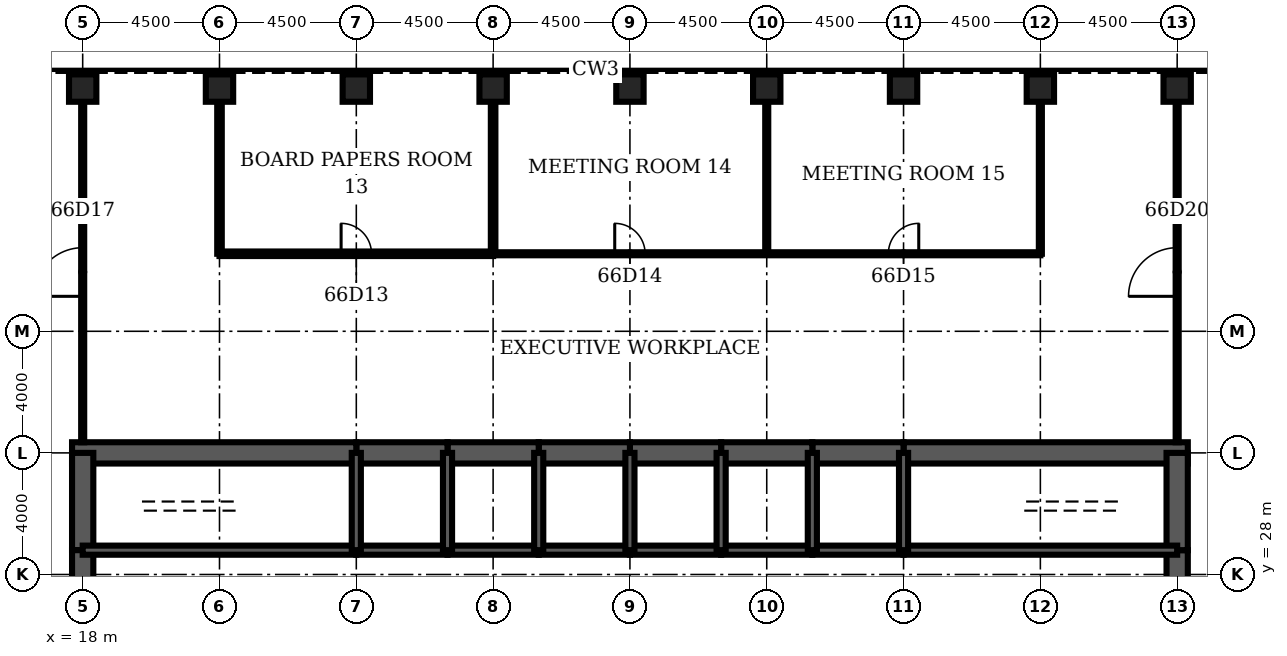
"""IFC4 building model, lengths in metres.
Left out: names, types, materials, properties, quantities, classifications, styles, units other than length and angle.
Written with IfcOpenShell. Run it as: python <this file> out.ifc"""

import sys

from ifc_helpers import new_model, si_unit, direction, frame, frame_2d, origin, origin_2d, place, context, subcontext, project, spatial, rectangle, hollow_rectangle, extrude, element, fill, save


model = new_model("IFC4")
c1 = context("Model", 3, precision=1e-05, world=origin(), true_north=direction((0.0, 1.0)))
c2 = subcontext(c1, "Body", "Model", "MODEL_VIEW")
j1 = project(units=[si_unit("LENGTHUNIT", "METRE"), si_unit("PLANEANGLEUNIT", "RADIAN")], contexts=[c1])
p1 = place(None, origin())
s1 = spatial("IfcSite", under=j1, at=p1, CompositionType="ELEMENT")
p2 = place(p1, origin())
s2 = spatial("IfcBuilding", under=s1, at=p2, CompositionType="ELEMENT")
p3 = place(p2, frame((0.0, 0.0, 292.1)))
s3 = spatial("IfcBuildingStorey", under=s2, at=p3, CompositionType="ELEMENT", Elevation=292.1)
for number, where, z_axis, x_axis in (
    (1, (54.0, 44.0, 0.0), (0.0, 0.0, 1.0), (0.0, 1.0, 0.0)),
    (2, (49.5, 44.0, 0.0), (0.0, 0.0, 1.0), (0.0, 1.0, 0.0)),
    (3, (45.0, 44.0, 0.0), (0.0, 0.0, 1.0), (0.0, 1.0, 0.0)),
    (4, (40.5, 44.0, 0.0), (0.0, 0.0, 1.0), (0.0, 1.0, 0.0)),
    (5, (36.0, 44.0, 0.0), (0.0, 0.0, 1.0), (0.0, 1.0, 0.0)),
    (6, (31.5, 44.0, 0.0), (0.0, 0.0, 1.0), (0.0, 1.0, 0.0)),
    (7, (27.0, 44.0, 0.0), (0.0, 0.0, 1.0), (0.0, 1.0, 0.0)),
    (8, (22.5, 44.0, 0.0), (0.0, 0.0, 1.0), (0.0, 1.0, 0.0)),
    (9, (18.0, 44.0, 0.0), (0.0, 0.0, 1.0), (0.0, 1.0, 0.0)),
):
    element("IfcColumn", number, at=place(p3, frame(where, z_axis=z_axis, x_axis=x_axis)), inside=s3, PredefinedType="COLUMN", context=c2, shape_type="SweptSolid", body=[
        extrude(hollow_rectangle(XDim=0.9, YDim=0.9, WallThickness=0.06, at=origin_2d()), origin(), (0.0, 0.0, 1.0), 4.2),
    ])
p4 = place(p3, frame((54.35, 32.0, 0.0), z_axis=(0.0, 0.0, 1.0), x_axis=(-1.0, 0.0, 0.0)))
e10 = element("IfcWall", 10, at=p4, inside=s3, PredefinedType="SHEAR", context=c2, shape_type="SweptSolid", body=[
    extrude(rectangle(XDim=9.35, YDim=0.7, at=frame_2d((4.675, 0.0))), origin(), (0.0, 0.0, 1.0), 4.2),
])
for number, where, z_axis, x_axis in (
    (11, (45.0, 32.0, 0.0), (0.0, 0.0, 1.0), (-1.0, 0.0, 0.0)),
    (12, (42.0, 32.0, 0.0), (0.0, 0.0, 1.0), (-1.0, 0.0, 0.0)),
    (13, (39.0, 32.0, 0.0), (0.0, 0.0, 1.0), (-1.0, 0.0, 0.0)),
    (14, (36.0, 32.0, 0.0), (0.0, 0.0, 1.0), (-1.0, 0.0, 0.0)),
    (15, (33.0, 32.0, 0.0), (0.0, 0.0, 1.0), (-1.0, 0.0, 0.0)),
    (16, (30.0, 32.0, 0.0), (0.0, 0.0, 1.0), (-1.0, 0.0, 0.0)),
):
    element("IfcWall", number, at=place(p3, frame(where, z_axis=z_axis, x_axis=x_axis)), inside=s3, PredefinedType="SHEAR", context=c2, shape_type="SweptSolid", body=[
        extrude(rectangle(XDim=3.0, YDim=0.7, at=frame_2d((1.5, 0.0))), origin(), (0.0, 0.0, 1.0), 4.2),
    ])
p5 = place(p3, frame((27.0, 32.0, 0.0), z_axis=(0.0, 0.0, 1.0), x_axis=(-1.0, 0.0, 0.0)))
e17 = element("IfcWall", 17, at=p5, inside=s3, PredefinedType="SHEAR", context=c2, shape_type="SweptSolid", body=[
    extrude(rectangle(XDim=9.35, YDim=0.7, at=frame_2d((4.675, 0.0))), origin(), (0.0, 0.0, 1.0), 4.2),
])
p6 = place(p3, frame((18.0, 32.0, 0.0), z_axis=(0.0, 0.0, 1.0), x_axis=(0.0, -1.0, 0.0)))
e18 = element("IfcWall", 18, at=p6, inside=s3, PredefinedType="SHEAR", context=c2, shape_type="SweptSolid", body=[
    extrude(rectangle(XDim=3.2, YDim=0.7, at=frame_2d((1.6, 0.0))), origin(), (0.0, 0.0, 1.0), 4.2),
])
p7 = place(p3, frame((18.0, 28.8, 0.0), z_axis=(0.0, 0.0, 1.0), x_axis=(0.0, -1.0, 0.0)))
e19 = element("IfcWall", 19, at=p7, inside=s3, PredefinedType="SHEAR", context=c2, shape_type="SweptSolid", body=[
    extrude(rectangle(XDim=2.8, YDim=0.7, at=frame_2d((1.4, 0.0))), origin(), (0.0, 0.0, 1.0), 4.2),
])
p8 = place(p7, frame((0.4, 0.0, 0.0)))
e20 = element("IfcOpeningElement", 20, at=p8, cuts=e19, PredefinedType="OPENING", context=c2, shape_type="SweptSolid", body=[
    extrude(rectangle(XDim=1.8, YDim=2.1, at=frame_2d((0.9, 1.05))), frame((0.0, 0.36, 0.0), z_axis=(0.0, -1.0, 0.0), x_axis=(1.0, 0.0, 0.0)), (0.0, 0.0, 1.0), 0.72),
])
p9 = place(p3, frame((54.0, 26.0, 0.0), z_axis=(0.0, 0.0, 1.0), x_axis=(0.0, 1.0, 0.0)))
e21 = element("IfcWall", 21, at=p9, inside=s3, PredefinedType="SHEAR", context=c2, shape_type="SweptSolid", body=[
    extrude(rectangle(XDim=2.8, YDim=0.7, at=frame_2d((1.4, 0.0))), origin(), (0.0, 0.0, 1.0), 4.2),
])
p10 = place(p9, frame((0.6, 0.0, 0.0)))
e22 = element("IfcOpeningElement", 22, at=p10, cuts=e21, PredefinedType="OPENING", context=c2, shape_type="SweptSolid", body=[
    extrude(rectangle(XDim=1.8, YDim=2.1, at=frame_2d((0.9, 1.05))), frame((0.0, 0.36, 0.0), z_axis=(0.0, -1.0, 0.0), x_axis=(1.0, 0.0, 0.0)), (0.0, 0.0, 1.0), 0.72),
])
p11 = place(p3, frame((54.0, 28.8, 0.0), z_axis=(0.0, 0.0, 1.0), x_axis=(0.0, 1.0, 0.0)))
e23 = element("IfcWall", 23, at=p11, inside=s3, PredefinedType="SHEAR", context=c2, shape_type="SweptSolid", body=[
    extrude(rectangle(XDim=3.2, YDim=0.7, at=frame_2d((1.6, 0.0))), origin(), (0.0, 0.0, 1.0), 4.2),
])
p12 = place(p3, frame((18.0, 28.8, 0.0), z_axis=(0.0, 0.0, 1.0), x_axis=(1.0, 0.0, 0.0)))
e24 = element("IfcWall", 24, at=p12, inside=s3, PredefinedType="SOLIDWALL", context=c2, shape_type="SweptSolid", body=[
    extrude(rectangle(XDim=9.0, YDim=0.3, at=frame_2d((4.5, 0.0))), origin(), (0.0, 0.0, 1.0), 4.2),
])
p13 = place(p12, frame((0.65, 0.0, 0.0)))
e25 = element("IfcOpeningElement", 25, at=p13, cuts=e24, PredefinedType="OPENING", context=c2, shape_type="SweptSolid", body=[
    extrude(rectangle(XDim=1.0, YDim=2.1, at=frame_2d((0.5, 1.05))), frame((0.0, 0.16, 0.0), z_axis=(0.0, -1.0, 0.0), x_axis=(1.0, 0.0, 0.0)), (0.0, 0.0, 1.0), 0.32),
])
p14 = place(p3, frame((27.0, 28.8, 0.0), z_axis=(0.0, 0.0, 1.0), x_axis=(1.0, 0.0, 0.0)))
e26 = element("IfcWall", 26, at=p14, inside=s3, PredefinedType="SOLIDWALL", context=c2, shape_type="SweptSolid", body=[
    extrude(rectangle(XDim=3.0, YDim=0.3, at=frame_2d((1.5, 0.0))), origin(), (0.0, 0.0, 1.0), 4.2),
])
p15 = place(p14, frame((0.95, 0.0, 0.0)))
e27 = element("IfcOpeningElement", 27, at=p15, cuts=e26, PredefinedType="OPENING", context=c2, shape_type="SweptSolid", body=[
    extrude(rectangle(XDim=1.1, YDim=2.2, at=frame_2d((0.55, 1.1))), frame((0.0, 0.16, 0.0), z_axis=(0.0, -1.0, 0.0), x_axis=(1.0, 0.0, 0.0)), (0.0, 0.0, 1.0), 0.32),
])
p16 = place(p3, frame((30.0, 28.8, 0.0), z_axis=(0.0, 0.0, 1.0), x_axis=(1.0, 0.0, 0.0)))
e28 = element("IfcWall", 28, at=p16, inside=s3, PredefinedType="SOLIDWALL", context=c2, shape_type="SweptSolid", body=[
    extrude(rectangle(XDim=3.0, YDim=0.3, at=frame_2d((1.5, 0.0))), origin(), (0.0, 0.0, 1.0), 4.2),
])
p17 = place(p16, frame((0.95, 0.0, 0.0)))
e29 = element("IfcOpeningElement", 29, at=p17, cuts=e28, PredefinedType="OPENING", context=c2, shape_type="SweptSolid", body=[
    extrude(rectangle(XDim=1.1, YDim=2.2, at=frame_2d((0.55, 1.1))), frame((0.0, 0.16, 0.0), z_axis=(0.0, -1.0, 0.0), x_axis=(1.0, 0.0, 0.0)), (0.0, 0.0, 1.0), 0.32),
])
p18 = place(p3, frame((33.0, 28.8, 0.0), z_axis=(0.0, 0.0, 1.0), x_axis=(1.0, 0.0, 0.0)))
e30 = element("IfcWall", 30, at=p18, inside=s3, PredefinedType="SOLIDWALL", context=c2, shape_type="SweptSolid", body=[
    extrude(rectangle(XDim=3.0, YDim=0.3, at=frame_2d((1.5, 0.0))), origin(), (0.0, 0.0, 1.0), 4.2),
])
p19 = place(p18, frame((0.95, 0.0, 0.0)))
e31 = element("IfcOpeningElement", 31, at=p19, cuts=e30, PredefinedType="OPENING", context=c2, shape_type="SweptSolid", body=[
    extrude(rectangle(XDim=1.1, YDim=2.2, at=frame_2d((0.55, 1.1))), frame((0.0, 0.16, 0.0), z_axis=(0.0, -1.0, 0.0), x_axis=(1.0, 0.0, 0.0)), (0.0, 0.0, 1.0), 0.32),
])
p20 = place(p3, frame((36.0, 28.8, 0.0), z_axis=(0.0, 0.0, 1.0), x_axis=(1.0, 0.0, 0.0)))
e32 = element("IfcWall", 32, at=p20, inside=s3, PredefinedType="SOLIDWALL", context=c2, shape_type="SweptSolid", body=[
    extrude(rectangle(XDim=3.0, YDim=0.3, at=frame_2d((1.5, 0.0))), origin(), (0.0, 0.0, 1.0), 4.2),
])
p21 = place(p20, frame((1.0, 0.0, 0.0)))
e33 = element("IfcOpeningElement", 33, at=p21, cuts=e32, PredefinedType="OPENING", context=c2, shape_type="SweptSolid", body=[
    extrude(rectangle(XDim=1.0, YDim=2.1, at=frame_2d((0.5, 1.05))), frame((0.0, 0.16, 0.0), z_axis=(0.0, -1.0, 0.0), x_axis=(1.0, 0.0, 0.0)), (0.0, 0.0, 1.0), 0.32),
])
p22 = place(p3, frame((39.0, 28.8, 0.0), z_axis=(0.0, 0.0, 1.0), x_axis=(1.0, 0.0, 0.0)))
e34 = element("IfcWall", 34, at=p22, inside=s3, PredefinedType="SOLIDWALL", context=c2, shape_type="SweptSolid", body=[
    extrude(rectangle(XDim=3.0, YDim=0.3, at=frame_2d((1.5, 0.0))), origin(), (0.0, 0.0, 1.0), 4.2),
])
p23 = place(p22, frame((1.0, 0.0, 0.0)))
e35 = element("IfcOpeningElement", 35, at=p23, cuts=e34, PredefinedType="OPENING", context=c2, shape_type="SweptSolid", body=[
    extrude(rectangle(XDim=1.0, YDim=2.1, at=frame_2d((0.5, 1.05))), frame((0.0, 0.16, 0.0), z_axis=(0.0, -1.0, 0.0), x_axis=(1.0, 0.0, 0.0)), (0.0, 0.0, 1.0), 0.32),
])
p24 = place(p3, frame((42.0, 28.8, 0.0), z_axis=(0.0, 0.0, 1.0), x_axis=(1.0, 0.0, 0.0)))
e36 = element("IfcWall", 36, at=p24, inside=s3, PredefinedType="SOLIDWALL", context=c2, shape_type="SweptSolid", body=[
    extrude(rectangle(XDim=3.0, YDim=0.3, at=frame_2d((1.5, 0.0))), origin(), (0.0, 0.0, 1.0), 4.2),
])
p25 = place(p24, frame((0.95, 0.0, 0.0)))
e37 = element("IfcOpeningElement", 37, at=p25, cuts=e36, PredefinedType="OPENING", context=c2, shape_type="SweptSolid", body=[
    extrude(rectangle(XDim=1.1, YDim=2.2, at=frame_2d((0.55, 1.1))), frame((0.0, 0.16, 0.0), z_axis=(0.0, -1.0, 0.0), x_axis=(1.0, 0.0, 0.0)), (0.0, 0.0, 1.0), 0.32),
])
p26 = place(p3, frame((45.0, 28.8, 0.0), z_axis=(0.0, 0.0, 1.0), x_axis=(1.0, 0.0, 0.0)))
e38 = element("IfcWall", 38, at=p26, inside=s3, PredefinedType="SOLIDWALL", context=c2, shape_type="SweptSolid", body=[
    extrude(rectangle(XDim=9.0, YDim=0.3, at=frame_2d((4.5, 0.0))), origin(), (0.0, 0.0, 1.0), 4.2),
])
p27 = place(p26, frame((7.35, 0.0, 0.0)))
e39 = element("IfcOpeningElement", 39, at=p27, cuts=e38, PredefinedType="OPENING", context=c2, shape_type="SweptSolid", body=[
    extrude(rectangle(XDim=1.0, YDim=2.1, at=frame_2d((0.5, 1.05))), frame((0.0, 0.16, 0.0), z_axis=(0.0, -1.0, 0.0), x_axis=(1.0, 0.0, 0.0)), (0.0, 0.0, 1.0), 0.32),
])
for number, where, z_axis, x_axis in (
    (40, (27.0, 28.8, 0.0), (0.0, 0.0, 1.0), (0.0, 1.0, 0.0)),
    (41, (30.0, 28.8, 0.0), (0.0, 0.0, 1.0), (0.0, 1.0, 0.0)),
    (42, (33.0, 28.8, 0.0), (0.0, 0.0, 1.0), (0.0, 1.0, 0.0)),
    (43, (36.0, 28.8, 0.0), (0.0, 0.0, 1.0), (0.0, 1.0, 0.0)),
    (44, (39.0, 28.8, 0.0), (0.0, 0.0, 1.0), (0.0, 1.0, 0.0)),
    (45, (42.0, 28.8, 0.0), (0.0, 0.0, 1.0), (0.0, 1.0, 0.0)),
    (46, (45.0, 28.8, 0.0), (0.0, 0.0, 1.0), (0.0, 1.0, 0.0)),
):
    element("IfcWall", number, at=place(p3, frame(where, z_axis=z_axis, x_axis=x_axis)), inside=s3, PredefinedType="SOLIDWALL", context=c2, shape_type="SweptSolid", body=[
        extrude(rectangle(XDim=3.2, YDim=0.3, at=frame_2d((1.6, 0.0))), origin(), (0.0, 0.0, 1.0), 4.2),
    ])
p28 = place(p3, frame((22.5, 38.55, 0.0), z_axis=(0.0, 0.0, 1.0), x_axis=(1.0, 0.0, 0.0)))
e47 = element("IfcWall", 47, at=p28, inside=s3, PredefinedType="PARTITIONING", context=c2, shape_type="SweptSolid", body=[
    extrude(rectangle(XDim=9.0, YDim=0.15, at=frame_2d((4.5, 0.0))), origin(), (0.0, 0.0, 1.0), 3.0),
])
p29 = place(p28, frame((4.0, 0.0, 0.0)))
e48 = element("IfcOpeningElement", 48, at=p29, cuts=e47, PredefinedType="OPENING", context=c2, shape_type="SweptSolid", body=[
    extrude(rectangle(XDim=1.0, YDim=2.1, at=frame_2d((0.5, 1.05))), frame((0.0, 0.085, 0.0), z_axis=(0.0, -1.0, 0.0), x_axis=(1.0, 0.0, 0.0)), (0.0, 0.0, 1.0), 0.17),
])
p30 = place(p3, frame((31.5, 38.55, 0.0), z_axis=(0.0, 0.0, 1.0), x_axis=(1.0, 0.0, 0.0)))
e49 = element("IfcWall", 49, at=p30, inside=s3, PredefinedType="PARTITIONING", context=c2, shape_type="SweptSolid", body=[
    extrude(rectangle(XDim=18.0, YDim=0.1, at=frame_2d((9.0, 0.0))), origin(), (0.0, 0.0, 1.0), 3.0),
])
p31 = place(p30, frame((4.0, 0.0, 0.0)))
e50 = element("IfcOpeningElement", 50, at=p31, cuts=e49, PredefinedType="OPENING", context=c2, shape_type="SweptSolid", body=[
    extrude(rectangle(XDim=1.0, YDim=2.1, at=frame_2d((0.5, 1.05))), frame((0.0, 0.06, 0.0), z_axis=(0.0, -1.0, 0.0), x_axis=(1.0, 0.0, 0.0)), (0.0, 0.0, 1.0), 0.12),
])
p32 = place(p30, frame((13.0, 0.0, 0.0)))
e51 = element("IfcOpeningElement", 51, at=p32, cuts=e49, PredefinedType="OPENING", context=c2, shape_type="SweptSolid", body=[
    extrude(rectangle(XDim=1.0, YDim=2.1, at=frame_2d((0.5, 1.05))), frame((0.0, 0.06, 0.0), z_axis=(0.0, -1.0, 0.0), x_axis=(1.0, 0.0, 0.0)), (0.0, 0.0, 1.0), 0.12),
])
p33 = place(p3, frame((18.0, 32.35, 0.0), z_axis=(0.0, 0.0, 1.0), x_axis=(0.0, 1.0, 0.0)))
e52 = element("IfcWall", 52, at=p33, inside=s3, PredefinedType="PARTITIONING", context=c2, shape_type="SweptSolid", body=[
    extrude(rectangle(XDim=11.2, YDim=0.1, at=frame_2d((5.6, 0.0))), origin(), (0.0, 0.0, 1.0), 3.0),
])
p34 = place(p33, frame((4.8, 0.0, 0.0)))
e53 = element("IfcOpeningElement", 53, at=p34, cuts=e52, PredefinedType="OPENING", context=c2, shape_type="SweptSolid", body=[
    extrude(rectangle(XDim=1.6, YDim=2.1, at=frame_2d((0.8, 1.05))), frame((0.0, 0.06, 0.0), z_axis=(0.0, -1.0, 0.0), x_axis=(1.0, 0.0, 0.0)), (0.0, 0.0, 1.0), 0.12),
])
for number, where, z_axis, x_axis in (
    (54, (22.5, 38.55, 0.0), (0.0, 0.0, 1.0), (0.0, 1.0, 0.0)),
    (55, (31.5, 38.55, 0.0), (0.0, 0.0, 1.0), (0.0, 1.0, 0.0)),
):
    element("IfcWall", number, at=place(p3, frame(where, z_axis=z_axis, x_axis=x_axis)), inside=s3, PredefinedType="PARTITIONING", context=c2, shape_type="SweptSolid", body=[
        extrude(rectangle(XDim=5.0, YDim=0.15, at=frame_2d((2.5, 0.0))), origin(), (0.0, 0.0, 1.0), 3.0),
    ])
for number, where, z_axis, x_axis in (
    (56, (40.5, 38.55, 0.0), (0.0, 0.0, 1.0), (0.0, 1.0, 0.0)),
    (57, (49.5, 38.55, 0.0), (0.0, 0.0, 1.0), (0.0, 1.0, 0.0)),
):
    element("IfcWall", number, at=place(p3, frame(where, z_axis=z_axis, x_axis=x_axis)), inside=s3, PredefinedType="PARTITIONING", context=c2, shape_type="SweptSolid", body=[
        extrude(rectangle(XDim=5.0, YDim=0.1, at=frame_2d((2.5, 0.0))), origin(), (0.0, 0.0, 1.0), 3.0),
    ])
p35 = place(p3, frame((54.0, 32.35, 0.0), z_axis=(0.0, 0.0, 1.0), x_axis=(0.0, 1.0, 0.0)))
e58 = element("IfcWall", 58, at=p35, inside=s3, PredefinedType="PARTITIONING", context=c2, shape_type="SweptSolid", body=[
    extrude(rectangle(XDim=11.2, YDim=0.1, at=frame_2d((5.6, 0.0))), origin(), (0.0, 0.0, 1.0), 3.0),
])
p36 = place(p35, frame((4.8, 0.0, 0.0)))
e59 = element("IfcOpeningElement", 59, at=p36, cuts=e58, PredefinedType="OPENING", context=c2, shape_type="SweptSolid", body=[
    extrude(rectangle(XDim=1.6, YDim=2.1, at=frame_2d((0.8, 1.05))), frame((0.0, 0.06, 0.0), z_axis=(0.0, -1.0, 0.0), x_axis=(1.0, 0.0, 0.0)), (0.0, 0.0, 1.0), 0.12),
])
p37 = place(p29, origin())
e60 = element("IfcDoor", 60, at=p37, inside=s3, OperationType="SINGLE_SWING_LEFT", PredefinedType="DOOR", context=c2, shape_type="SweptSolid", body=[
    extrude(rectangle(XDim=1.0, YDim=2.1, at=frame_2d((0.5, 1.05))), frame((0.0, 0.025, 0.0), z_axis=(0.0, -1.0, 0.0), x_axis=(1.0, 0.0, 0.0)), (0.0, 0.0, 1.0), 0.05),
])
fill(e48, e60)
p38 = place(p31, origin())
e61 = element("IfcDoor", 61, at=p38, inside=s3, OperationType="SINGLE_SWING_LEFT", PredefinedType="DOOR", context=c2, shape_type="SweptSolid", body=[
    extrude(rectangle(XDim=1.0, YDim=2.1, at=frame_2d((0.5, 1.05))), frame((0.0, 0.025, 0.0), z_axis=(0.0, -1.0, 0.0), x_axis=(1.0, 0.0, 0.0)), (0.0, 0.0, 1.0), 0.05),
])
fill(e50, e61)
p39 = place(p32, origin())
e62 = element("IfcDoor", 62, at=p39, inside=s3, OperationType="SINGLE_SWING_RIGHT", PredefinedType="DOOR", context=c2, shape_type="SweptSolid", body=[
    extrude(rectangle(XDim=1.0, YDim=2.1, at=frame_2d((0.5, 1.05))), frame((0.0, 0.025, 0.0), z_axis=(0.0, -1.0, 0.0), x_axis=(1.0, 0.0, 0.0)), (0.0, 0.0, 1.0), 0.05),
])
fill(e51, e62)
p40 = place(p34, origin())
e63 = element("IfcDoor", 63, at=p40, inside=s3, OperationType="SINGLE_SWING_LEFT", PredefinedType="DOOR", context=c2, shape_type="SweptSolid", body=[
    extrude(rectangle(XDim=1.6, YDim=2.1, at=frame_2d((0.8, 1.05))), frame((0.0, 0.025, 0.0), z_axis=(0.0, -1.0, 0.0), x_axis=(1.0, 0.0, 0.0)), (0.0, 0.0, 1.0), 0.05),
])
fill(e53, e63)
p41 = place(p36, origin())
e64 = element("IfcDoor", 64, at=p41, inside=s3, OperationType="SINGLE_SWING_LEFT", PredefinedType="DOOR", context=c2, shape_type="SweptSolid", body=[
    extrude(rectangle(XDim=1.6, YDim=2.1, at=frame_2d((0.8, 1.05))), frame((0.0, 0.025, 0.0), z_axis=(0.0, -1.0, 0.0), x_axis=(1.0, 0.0, 0.0)), (0.0, 0.0, 1.0), 0.05),
])
fill(e59, e64)
p42 = place(p25, origin())
e65 = element("IfcDoor", 65, at=p42, inside=s3, OperationType="DOUBLE_DOOR_SLIDING", PredefinedType="USERDEFINED", context=c2, shape_type="SweptSolid", body=[
    extrude(rectangle(XDim=1.1, YDim=2.2, at=frame_2d((0.55, 1.1))), frame((0.0, 0.025, 0.0), z_axis=(0.0, -1.0, 0.0), x_axis=(1.0, 0.0, 0.0)), (0.0, 0.0, 1.0), 0.05),
])
fill(e37, e65)
p43 = place(p15, origin())
e66 = element("IfcDoor", 66, at=p43, inside=s3, OperationType="DOUBLE_DOOR_SLIDING", PredefinedType="USERDEFINED", context=c2, shape_type="SweptSolid", body=[
    extrude(rectangle(XDim=1.1, YDim=2.2, at=frame_2d((0.55, 1.1))), frame((0.0, 0.025, 0.0), z_axis=(0.0, -1.0, 0.0), x_axis=(1.0, 0.0, 0.0)), (0.0, 0.0, 1.0), 0.05),
])
fill(e27, e66)
p44 = place(p17, origin())
e67 = element("IfcDoor", 67, at=p44, inside=s3, OperationType="DOUBLE_DOOR_SLIDING", PredefinedType="USERDEFINED", context=c2, shape_type="SweptSolid", body=[
    extrude(rectangle(XDim=1.1, YDim=2.2, at=frame_2d((0.55, 1.1))), frame((0.0, 0.025, 0.0), z_axis=(0.0, -1.0, 0.0), x_axis=(1.0, 0.0, 0.0)), (0.0, 0.0, 1.0), 0.05),
])
fill(e29, e67)
p45 = place(p19, origin())
e68 = element("IfcDoor", 68, at=p45, inside=s3, OperationType="DOUBLE_DOOR_SLIDING", PredefinedType="USERDEFINED", context=c2, shape_type="SweptSolid", body=[
    extrude(rectangle(XDim=1.1, YDim=2.2, at=frame_2d((0.55, 1.1))), frame((0.0, 0.025, 0.0), z_axis=(0.0, -1.0, 0.0), x_axis=(1.0, 0.0, 0.0)), (0.0, 0.0, 1.0), 0.05),
])
fill(e31, e68)
p46 = place(p13, origin())
e69 = element("IfcDoor", 69, at=p46, inside=s3, OperationType="SINGLE_SWING_LEFT", PredefinedType="DOOR", context=c2, shape_type="SweptSolid", body=[
    extrude(rectangle(XDim=1.0, YDim=2.1, at=frame_2d((0.5, 1.05))), frame((0.0, 0.025, 0.0), z_axis=(0.0, -1.0, 0.0), x_axis=(1.0, 0.0, 0.0)), (0.0, 0.0, 1.0), 0.05),
])
fill(e25, e69)
p47 = place(p27, origin())
e70 = element("IfcDoor", 70, at=p47, inside=s3, OperationType="SINGLE_SWING_RIGHT", PredefinedType="DOOR", context=c2, shape_type="SweptSolid", body=[
    extrude(rectangle(XDim=1.0, YDim=2.1, at=frame_2d((0.5, 1.05))), frame((0.0, 0.025, 0.0), z_axis=(0.0, -1.0, 0.0), x_axis=(1.0, 0.0, 0.0)), (0.0, 0.0, 1.0), 0.05),
])
fill(e39, e70)
p48 = place(p8, origin())
e71 = element("IfcDoor", 71, at=p48, inside=s3, OperationType="SINGLE_SWING_LEFT", PredefinedType="DOOR", context=c2, shape_type="SweptSolid", body=[
    extrude(rectangle(XDim=1.8, YDim=2.1, at=frame_2d((0.9, 1.05))), frame((0.0, 0.35, 0.0), z_axis=(0.0, -1.0, 0.0), x_axis=(1.0, 0.0, 0.0)), (0.0, 0.0, 1.0), 0.699),
])
fill(e20, e71)
p49 = place(p10, origin())
e72 = element("IfcDoor", 72, at=p49, inside=s3, OperationType="SINGLE_SWING_LEFT", PredefinedType="DOOR", context=c2, shape_type="SweptSolid", body=[
    extrude(rectangle(XDim=1.8, YDim=2.1, at=frame_2d((0.9, 1.05))), frame((0.0, 0.35, 0.0), z_axis=(0.0, -1.0, 0.0), x_axis=(1.0, 0.0, 0.0)), (0.0, 0.0, 1.0), 0.699),
])
fill(e22, e72)
p50 = place(p21, origin())
e73 = element("IfcDoor", 73, at=p50, inside=s3, OperationType="SINGLE_SWING_LEFT", PredefinedType="DOOR", context=c2, shape_type="SweptSolid", body=[
    extrude(rectangle(XDim=1.0, YDim=2.1, at=frame_2d((0.5, 1.05))), frame((0.0, 0.025, 0.0), z_axis=(0.0, -1.0, 0.0), x_axis=(1.0, 0.0, 0.0)), (0.0, 0.0, 1.0), 0.05),
])
fill(e33, e73)
p51 = place(p23, origin())
e74 = element("IfcDoor", 74, at=p51, inside=s3, OperationType="SINGLE_SWING_LEFT", PredefinedType="DOOR", context=c2, shape_type="SweptSolid", body=[
    extrude(rectangle(XDim=1.0, YDim=2.1, at=frame_2d((0.5, 1.05))), frame((0.0, 0.025, 0.0), z_axis=(0.0, -1.0, 0.0), x_axis=(1.0, 0.0, 0.0)), (0.0, 0.0, 1.0), 0.05),
])
fill(e35, e74)
save(model, sys.argv[1])
